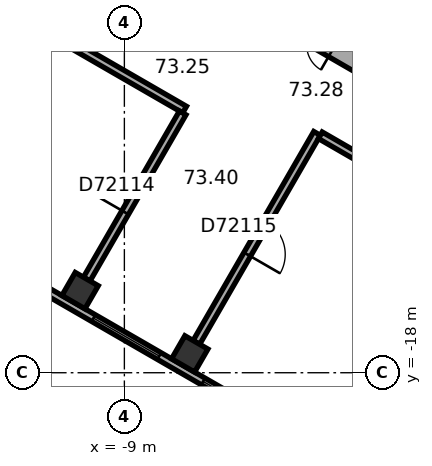
"""IFC4 building model, lengths in metres.
Left out: names, types, materials, properties, quantities, classifications, styles, units other than length and angle.
Written with IfcOpenShell. Run it as: python <this file> out.ifc"""

import sys

from ifc_helpers import new_model, si_unit, direction, frame, frame_2d, origin, origin_2d, place, context, subcontext, project, spatial, rectangle, extrude, element, fill, save


model = new_model("IFC4")
c1 = context("Model", 3, precision=1e-05, world=origin(), true_north=direction((0.0, 1.0)))
c2 = subcontext(c1, "Body", "Model", "MODEL_VIEW")
j1 = project(units=[si_unit("LENGTHUNIT", "METRE"), si_unit("PLANEANGLEUNIT", "RADIAN")], contexts=[c1])
p1 = place(None, origin())
s1 = spatial("IfcSite", under=j1, at=p1, CompositionType="ELEMENT")
p2 = place(p1, origin())
s2 = spatial("IfcBuilding", under=s1, at=p2, CompositionType="ELEMENT")
p3 = place(p2, frame((0.0, 0.0, 296.8)))
s3 = spatial("IfcBuildingStorey", under=s2, at=p3, CompositionType="ELEMENT", Elevation=296.8)
for number, where, z_axis, x_axis in (
    (1, (-10.165, -15.84, 0.0), (0.0, 0.0, 1.0), (0.866, -0.5, 0.0)),
    (2, (-7.28, -17.505, 0.0), (0.0, 0.0, 1.0), (0.866, -0.5, 0.0)),
):
    element("IfcColumn", number, at=place(p3, frame(where, z_axis=z_axis, x_axis=x_axis)), inside=s3, PredefinedType="COLUMN", context=c2, shape_type="SweptSolid", body=[
        extrude(rectangle(XDim=0.7, YDim=0.7, at=origin_2d()), origin(), (0.0, 0.0, 1.0), 3.7),
    ])
p4 = place(p3, frame((-10.025, -5.586, 0.0), z_axis=(0.0, 0.0, 1.0), x_axis=(0.866026453023, -0.499998182661, 0.0)))
e3 = element("IfcWall", 3, at=p4, inside=s3, PredefinedType="SHEAR", context=c2, shape_type="SweptSolid", body=[
    extrude(rectangle(XDim=11.778, YDim=0.7, at=frame_2d((5.889, 0.0))), origin(), (0.0, 0.0, 1.0), 3.7),
])
p5 = place(p4, frame((6.089, 0.0, 0.0)))
e4 = element("IfcOpeningElement", 4, at=p5, cuts=e3, PredefinedType="OPENING", context=c2, shape_type="SweptSolid", body=[
    extrude(rectangle(XDim=1.5, YDim=2.1, at=frame_2d((0.75, 1.05))), frame((0.0, 0.36, 0.0), z_axis=(0.0, -1.0, 0.0), x_axis=(1.0, 0.0, 0.0)), (0.0, 0.0, 1.0), 0.72),
])
p6 = place(p4, frame((1.539, 0.0, 0.0)))
e5 = element("IfcOpeningElement", 5, at=p6, cuts=e3, PredefinedType="OPENING", context=c2, shape_type="SweptSolid", body=[
    extrude(rectangle(XDim=1.1, YDim=2.1, at=frame_2d((0.55, 1.05))), frame((0.0, 0.36, 0.0), z_axis=(0.0, -1.0, 0.0), x_axis=(1.0, 0.0, 0.0)), (0.0, 0.0, 1.0), 0.72),
])
p7 = place(p4, frame((4.139, 0.0, 0.0)))
e6 = element("IfcOpeningElement", 6, at=p7, cuts=e3, PredefinedType="OPENING", context=c2, shape_type="SweptSolid", body=[
    extrude(rectangle(XDim=1.1, YDim=2.1, at=frame_2d((0.55, 1.05))), frame((0.0, 0.36, 0.0), z_axis=(0.0, -1.0, 0.0), x_axis=(1.0, 0.0, 0.0)), (0.0, 0.0, 1.0), 0.72),
])
p8 = place(p3, frame((-16.626, -12.629, 0.0), z_axis=(0.0, 0.0, 1.0), x_axis=(0.866026460444, -0.499998169808, 0.0)))
e7 = element("IfcWall", 7, at=p8, inside=s3, PredefinedType="STANDARD", context=c2, shape_type="SweptSolid", body=[
    extrude(rectangle(XDim=17.731, YDim=0.2, at=frame_2d((8.866, 0.0))), origin(), (0.0, 0.0, 1.0), 3.7),
])
p9 = place(p8, frame((1.203, 0.0, 0.9)))
e8 = element("IfcOpeningElement", 8, at=p9, cuts=e7, PredefinedType="OPENING", context=c2, shape_type="SweptSolid", body=[
    extrude(rectangle(XDim=2.0, YDim=2.0, at=frame_2d((1.0, 1.0))), frame((0.0, 0.11, 0.0), z_axis=(0.0, -1.0, 0.0), x_axis=(1.0, 0.0, 0.0)), (0.0, 0.0, 1.0), 0.22),
])
p10 = place(p8, frame((4.535, 0.0, 0.9)))
e9 = element("IfcOpeningElement", 9, at=p10, cuts=e7, PredefinedType="OPENING", context=c2, shape_type="SweptSolid", body=[
    extrude(rectangle(XDim=2.0, YDim=2.0, at=frame_2d((1.0, 1.0))), frame((0.0, 0.11, 0.0), z_axis=(0.0, -1.0, 0.0), x_axis=(1.0, 0.0, 0.0)), (0.0, 0.0, 1.0), 0.22),
])
p11 = place(p8, frame((7.867, 0.0, 0.9)))
e10 = element("IfcOpeningElement", 10, at=p11, cuts=e7, PredefinedType="OPENING", context=c2, shape_type="SweptSolid", body=[
    extrude(rectangle(XDim=2.0, YDim=2.0, at=frame_2d((1.0, 1.0))), frame((0.0, 0.11, 0.0), z_axis=(0.0, -1.0, 0.0), x_axis=(1.0, 0.0, 0.0)), (0.0, 0.0, 1.0), 0.22),
])
p12 = place(p8, frame((11.198, 0.0, 0.9)))
e11 = element("IfcOpeningElement", 11, at=p12, cuts=e7, PredefinedType="OPENING", context=c2, shape_type="SweptSolid", body=[
    extrude(rectangle(XDim=2.0, YDim=2.0, at=frame_2d((1.0, 1.0))), frame((0.0, 0.11, 0.0), z_axis=(0.0, -1.0, 0.0), x_axis=(1.0, 0.0, 0.0)), (0.0, 0.0, 1.0), 0.22),
])
p13 = place(p8, frame((14.53, 0.0, 0.9)))
e12 = element("IfcOpeningElement", 12, at=p13, cuts=e7, PredefinedType="OPENING", context=c2, shape_type="SweptSolid", body=[
    extrude(rectangle(XDim=2.0, YDim=2.0, at=frame_2d((1.0, 1.0))), frame((0.0, 0.11, 0.0), z_axis=(0.0, -1.0, 0.0), x_axis=(1.0, 0.0, 0.0)), (0.0, 0.0, 1.0), 0.22),
])
p14 = place(p3, frame((-11.501, -8.719, 0.0), z_axis=(0.0, 0.0, 1.0), x_axis=(0.866024434742, -0.500001678427, 0.0)))
e13 = element("IfcWall", 13, at=p14, inside=s3, PredefinedType="PARTITIONING", context=c2, shape_type="SweptSolid", body=[
    extrude(rectangle(XDim=4.718, YDim=0.2, at=frame_2d((2.359, 0.0))), origin(), (0.0, 0.0, 1.0), 3.35),
])
p15 = place(p3, frame((-9.99, -15.537, 0.0), z_axis=(0.0, 0.0, 1.0), x_axis=(0.499966611936, 0.866044679534, 0.0)))
e14 = element("IfcWall", 14, at=p15, inside=s3, PredefinedType="PARTITIONING", context=c2, shape_type="SweptSolid", body=[
    extrude(rectangle(XDim=5.049, YDim=0.2, at=frame_2d((2.524, 0.0))), origin(), (0.0, 0.0, 1.0), 2.65),
])
p16 = place(p15, frame((2.024, 0.0, 0.0)))
e15 = element("IfcOpeningElement", 15, at=p16, cuts=e14, PredefinedType="OPENING", context=c2, shape_type="SweptSolid", body=[
    extrude(rectangle(XDim=1.0, YDim=2.1, at=frame_2d((0.5, 1.05))), frame((0.0, 0.11, 0.0), z_axis=(0.0, -1.0, 0.0), x_axis=(1.0, 0.0, 0.0)), (0.0, 0.0, 1.0), 0.22),
])
p17 = place(p3, frame((-7.105, -17.202, 0.0), z_axis=(0.0, 0.0, 1.0), x_axis=(0.499988692146, 0.866031932279, 0.0)))
e16 = element("IfcWall", 16, at=p17, inside=s3, PredefinedType="PARTITIONING", context=c2, shape_type="SweptSolid", body=[
    extrude(rectangle(XDim=6.35, YDim=0.2, at=frame_2d((3.175, 0.0))), origin(), (0.0, 0.0, 1.0), 3.35),
])
p18 = place(p17, frame((2.675, 0.0, 0.0)))
e17 = element("IfcOpeningElement", 17, at=p18, cuts=e16, PredefinedType="OPENING", context=c2, shape_type="SweptSolid", body=[
    extrude(rectangle(XDim=1.0, YDim=2.1, at=frame_2d((0.5, 1.05))), frame((0.0, 0.11, 0.0), z_axis=(0.0, -1.0, 0.0), x_axis=(1.0, 0.0, 0.0)), (0.0, 0.0, 1.0), 0.22),
])
p19 = place(p3, frame((-3.843, -11.753, 0.0), z_axis=(0.0, 0.0, 1.0), x_axis=(0.866031037473, -0.499990242038, 0.0)))
e18 = element("IfcWall", 18, at=p19, inside=s3, PredefinedType="PARTITIONING", context=c2, shape_type="SweptSolid", body=[
    extrude(rectangle(XDim=3.341, YDim=0.2, at=frame_2d((1.67, 0.0))), origin(), (0.0, 0.0, 1.0), 3.35),
])
p20 = place(p11, origin())
e19 = element("IfcWindow", 19, at=p20, inside=s3, PartitioningType="SINGLE_PANEL", PredefinedType="WINDOW", context=c2, shape_type="SweptSolid", body=[
    extrude(rectangle(XDim=2.0, YDim=2.0, at=frame_2d((1.0, 1.0))), frame((0.0, 0.03, 0.0), z_axis=(0.0, -1.0, 0.0), x_axis=(1.0, 0.0, 0.0)), (0.0, 0.0, 1.0), 0.06),
])
fill(e10, e19)
p21 = place(p12, origin())
e20 = element("IfcWindow", 20, at=p21, inside=s3, PartitioningType="SINGLE_PANEL", PredefinedType="WINDOW", context=c2, shape_type="SweptSolid", body=[
    extrude(rectangle(XDim=2.0, YDim=2.0, at=frame_2d((1.0, 1.0))), frame((0.0, 0.03, 0.0), z_axis=(0.0, -1.0, 0.0), x_axis=(1.0, 0.0, 0.0)), (0.0, 0.0, 1.0), 0.06),
])
fill(e11, e20)
p22 = place(p16, origin())
e21 = element("IfcDoor", 21, at=p22, inside=s3, OperationType="SINGLE_SWING_LEFT", PredefinedType="DOOR", context=c2, shape_type="SweptSolid", body=[
    extrude(rectangle(XDim=1.0, YDim=2.1, at=frame_2d((0.5, 1.05))), frame((0.0, 0.025, 0.0), z_axis=(0.0, -1.0, 0.0), x_axis=(1.0, 0.0, 0.0)), (0.0, 0.0, 1.0), 0.05),
])
fill(e15, e21)
p23 = place(p18, origin())
e22 = element("IfcDoor", 22, at=p23, inside=s3, OperationType="SINGLE_SWING_LEFT", PredefinedType="DOOR", context=c2, shape_type="SweptSolid", body=[
    extrude(rectangle(XDim=1.0, YDim=2.1, at=frame_2d((0.5, 1.05))), frame((0.0, 0.025, 0.0), z_axis=(0.0, -1.0, 0.0), x_axis=(1.0, 0.0, 0.0)), (0.0, 0.0, 1.0), 0.05),
])
fill(e17, e22)
save(model, sys.argv[1])
